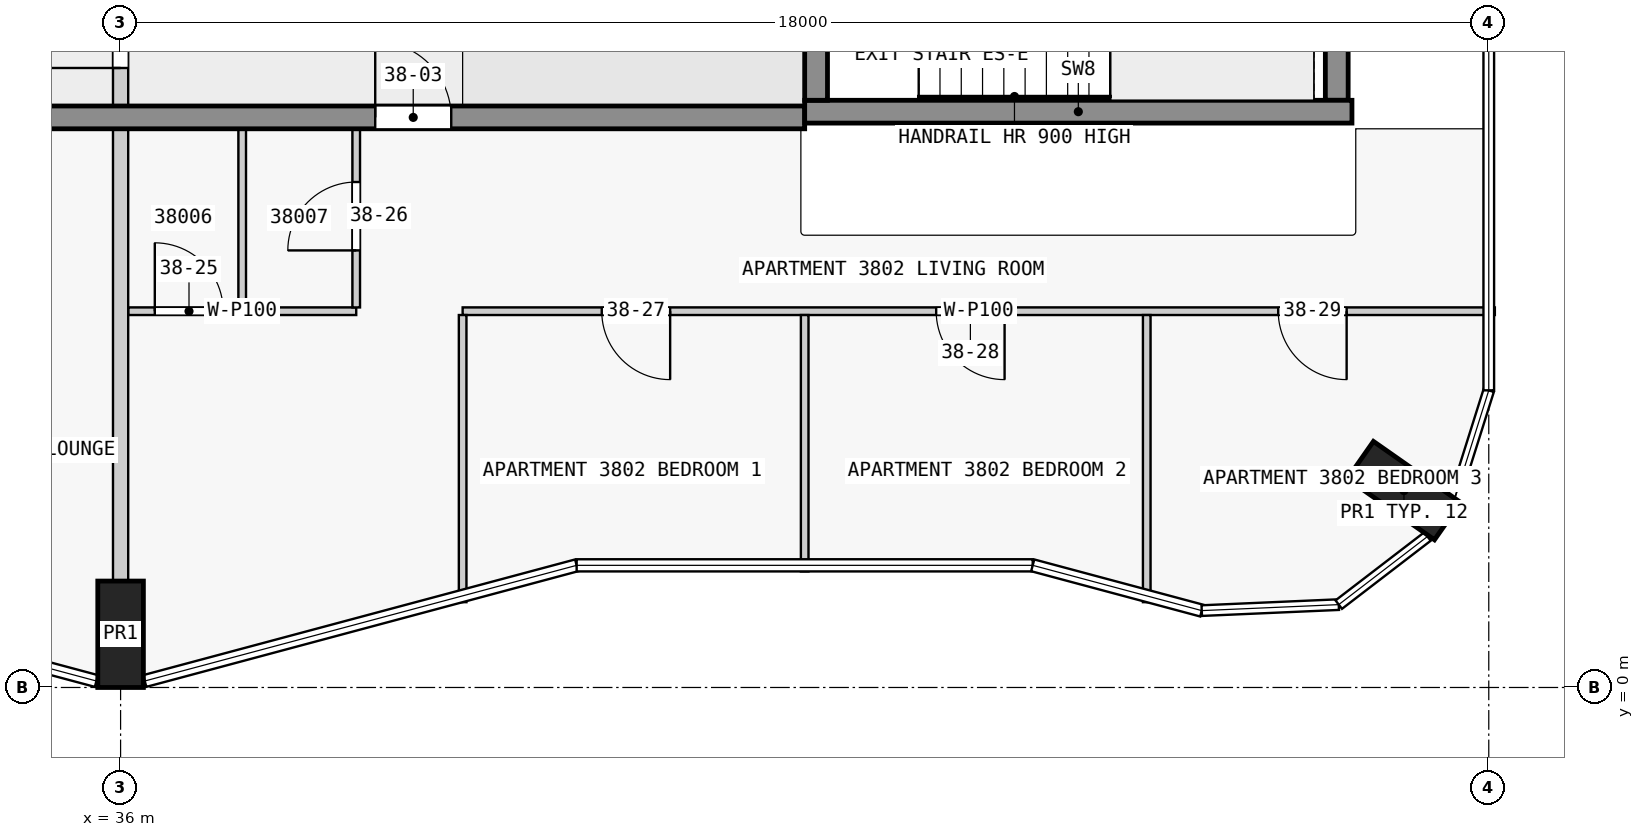
"""IFC4 building model, lengths in metres.
Left out: names, types, materials, properties, quantities, classifications, styles, units other than length and angle.
Written with IfcOpenShell. Run it as: python <this file> out.ifc"""

import sys

from ifc_helpers import new_model, si_unit, direction, frame, frame_2d, origin, origin_2d, place, context, subcontext, project, spatial, rectangle, extrude, element, fill, save


model = new_model("IFC4")
c1 = context("Model", 3, precision=1e-05, world=origin(), true_north=direction((0.0, 1.0)))
c2 = subcontext(c1, "Body", "Model", "MODEL_VIEW")
j1 = project(units=[si_unit("LENGTHUNIT", "METRE"), si_unit("PLANEANGLEUNIT", "RADIAN")], contexts=[c1])
p1 = place(None, origin())
s1 = spatial("IfcSite", under=j1, at=p1, CompositionType="ELEMENT")
p2 = place(p1, origin())
s2 = spatial("IfcBuilding", under=s1, at=p2, CompositionType="ELEMENT")
p3 = place(p2, frame((0.0, 0.0, 149.9)))
s3 = spatial("IfcBuildingStorey", under=s2, at=p3, CompositionType="ELEMENT", Elevation=149.9)
for number, where, z_axis, x_axis in (
    (1, (36.0, 0.7, 0.0), (0.0, 0.0, 1.0), (1.0, 0.0, 0.0)),
    (2, (52.884, 2.59, 0.0), (0.0, 0.0, 1.0), (0.574, 0.819, 0.0)),
):
    element("IfcColumn", number, at=place(p3, frame(where, z_axis=z_axis, x_axis=x_axis)), inside=s3, PredefinedType="COLUMN", context=c2, shape_type="SweptSolid", body=[
        extrude(rectangle(XDim=0.6, YDim=1.4, at=origin_2d()), origin(), (0.0, 0.0, 1.0), 3.5),
    ])
p4 = place(p3, frame((45.15, 7.725, 0.0), z_axis=(0.0, 0.0, 1.0), x_axis=(0.0, 1.0, 0.0)))
e3 = element("IfcWall", 3, at=p4, inside=s3, PredefinedType="SHEAR", context=c2, shape_type="SweptSolid", body=[
    extrude(rectangle(XDim=2.55, YDim=0.3, at=frame_2d((1.275, 0.0))), origin(), (0.0, 0.0, 1.0), 3.5),
])
p5 = place(p4, frame((0.725, 0.0, 0.0)))
e4 = element("IfcOpeningElement", 4, at=p5, cuts=e3, PredefinedType="OPENING", context=c2, shape_type="SweptSolid", body=[
    extrude(rectangle(XDim=1.1, YDim=2.1, at=frame_2d((0.55, 1.05))), frame((0.0, 0.16, 0.0), z_axis=(0.0, -1.0, 0.0), x_axis=(1.0, 0.0, 0.0)), (0.0, 0.0, 1.0), 0.32),
])
p6 = place(p3, frame((52.0, 7.725, 0.0), z_axis=(0.0, 0.0, 1.0), x_axis=(0.0, 1.0, 0.0)))
e5 = element("IfcWall", 5, at=p6, inside=s3, PredefinedType="SHEAR", context=c2, shape_type="SweptSolid", body=[
    extrude(rectangle(XDim=2.55, YDim=0.3, at=frame_2d((1.275, 0.0))), origin(), (0.0, 0.0, 1.0), 3.5),
])
p7 = place(p3, frame((45.0, 7.575, 0.0), z_axis=(0.0, 0.0, 1.0), x_axis=(1.0, 0.0, 0.0)))
e6 = element("IfcWall", 6, at=p7, inside=s3, PredefinedType="SHEAR", context=c2, shape_type="SweptSolid", body=[
    extrude(rectangle(XDim=7.2, YDim=0.3, at=frame_2d((3.6, 0.0))), origin(), (0.0, 0.0, 1.0), 3.5),
])
p8 = place(p3, frame((22.5, 7.5, 0.0), z_axis=(0.0, 0.0, 1.0), x_axis=(1.0, 0.0, 0.0)))
e7 = element("IfcWall", 7, at=p8, inside=s3, PredefinedType="SHEAR", context=c2, shape_type="SweptSolid", body=[
    extrude(rectangle(XDim=22.5, YDim=0.3, at=frame_2d((11.25, 0.0))), origin(), (0.0, 0.0, 1.0), 3.25),
])
p9 = place(p8, frame((4.05, 0.0, 0.0)))
e8 = element("IfcOpeningElement", 8, at=p9, cuts=e7, PredefinedType="OPENING", context=c2, shape_type="SweptSolid", body=[
    extrude(rectangle(XDim=1.0, YDim=2.1, at=frame_2d((0.5, 1.05))), frame((0.0, 0.16, 0.0), z_axis=(0.0, -1.0, 0.0), x_axis=(1.0, 0.0, 0.0)), (0.0, 0.0, 1.0), 0.32),
])
p10 = place(p8, frame((10.35, 0.0, 0.0)))
e9 = element("IfcOpeningElement", 9, at=p10, cuts=e7, PredefinedType="OPENING", context=c2, shape_type="SweptSolid", body=[
    extrude(rectangle(XDim=1.8, YDim=2.1, at=frame_2d((0.9, 1.05))), frame((0.0, 0.16, 0.0), z_axis=(0.0, -1.0, 0.0), x_axis=(1.0, 0.0, 0.0)), (0.0, 0.0, 1.0), 0.32),
])
p11 = place(p8, frame((16.85, 0.0, 0.0)))
e10 = element("IfcOpeningElement", 10, at=p11, cuts=e7, PredefinedType="OPENING", context=c2, shape_type="SweptSolid", body=[
    extrude(rectangle(XDim=1.0, YDim=2.1, at=frame_2d((0.5, 1.05))), frame((0.0, 0.16, 0.0), z_axis=(0.0, -1.0, 0.0), x_axis=(1.0, 0.0, 0.0)), (0.0, 0.0, 1.0), 0.32),
])
p12 = place(p3, frame((54.08, 4.95, 0.0), z_axis=(0.0, 0.0, 1.0), x_axis=(-1.0, 0.0, 0.0)))
e11 = element("IfcWall", 11, at=p12, inside=s3, PredefinedType="PARTITIONING", context=c2, shape_type="SweptSolid", body=[
    extrude(rectangle(XDim=13.58, YDim=0.1, at=frame_2d((6.79, 0.0))), origin(), (0.0, 0.0, 1.0), 3.25),
])
p13 = place(p12, frame((10.85, 0.0, 0.0)))
e12 = element("IfcOpeningElement", 12, at=p13, cuts=e11, PredefinedType="OPENING", context=c2, shape_type="SweptSolid", body=[
    extrude(rectangle(XDim=0.9, YDim=2.1, at=frame_2d((0.45, 1.05))), frame((0.0, 0.06, 0.0), z_axis=(0.0, -1.0, 0.0), x_axis=(1.0, 0.0, 0.0)), (0.0, 0.0, 1.0), 0.12),
])
p14 = place(p12, frame((6.45, 0.0, 0.0)))
e13 = element("IfcOpeningElement", 13, at=p14, cuts=e11, PredefinedType="OPENING", context=c2, shape_type="SweptSolid", body=[
    extrude(rectangle(XDim=0.9, YDim=2.1, at=frame_2d((0.45, 1.05))), frame((0.0, 0.06, 0.0), z_axis=(0.0, -1.0, 0.0), x_axis=(1.0, 0.0, 0.0)), (0.0, 0.0, 1.0), 0.12),
])
p15 = place(p12, frame((1.95, 0.0, 0.0)))
e14 = element("IfcOpeningElement", 14, at=p15, cuts=e11, PredefinedType="OPENING", context=c2, shape_type="SweptSolid", body=[
    extrude(rectangle(XDim=0.9, YDim=2.1, at=frame_2d((0.45, 1.05))), frame((0.0, 0.06, 0.0), z_axis=(0.0, -1.0, 0.0), x_axis=(1.0, 0.0, 0.0)), (0.0, 0.0, 1.0), 0.12),
])
p16 = place(p3, frame((36.1, 4.95, 0.0), z_axis=(0.0, 0.0, 1.0), x_axis=(1.0, 0.0, 0.0)))
e15 = element("IfcWall", 15, at=p16, inside=s3, PredefinedType="PARTITIONING", context=c2, shape_type="SweptSolid", body=[
    extrude(rectangle(XDim=3.0, YDim=0.1, at=frame_2d((1.5, 0.0))), origin(), (0.0, 0.0, 1.0), 3.25),
])
p17 = place(p16, frame((0.35, 0.0, 0.0)))
e16 = element("IfcOpeningElement", 16, at=p17, cuts=e15, PredefinedType="OPENING", context=c2, shape_type="SweptSolid", body=[
    extrude(rectangle(XDim=0.9, YDim=2.1, at=frame_2d((0.45, 1.05))), frame((0.0, 0.06, 0.0), z_axis=(0.0, -1.0, 0.0), x_axis=(1.0, 0.0, 0.0)), (0.0, 0.0, 1.0), 0.12),
])
p18 = place(p3, frame((36.0, 1.4, 0.0), z_axis=(0.0, 0.0, 1.0), x_axis=(0.0, 1.0, 0.0)))
e17 = element("IfcWall", 17, at=p18, inside=s3, PredefinedType="PARTITIONING", context=c2, shape_type="SweptSolid", body=[
    extrude(rectangle(XDim=5.95, YDim=0.2, at=frame_2d((2.975, 0.0))), origin(), (0.0, 0.0, 1.0), 3.25),
])
p19 = place(p3, frame((37.6, 5.0, 0.0), z_axis=(0.0, 0.0, 1.0), x_axis=(0.0, 1.0, 0.0)))
e18 = element("IfcWall", 18, at=p19, inside=s3, PredefinedType="PARTITIONING", context=c2, shape_type="SweptSolid", body=[
    extrude(rectangle(XDim=2.35, YDim=0.1, at=frame_2d((1.175, 0.0))), origin(), (0.0, 0.0, 1.0), 3.25),
])
p20 = place(p3, frame((39.1, 5.0, 0.0), z_axis=(0.0, 0.0, 1.0), x_axis=(0.0, 1.0, 0.0)))
e19 = element("IfcWall", 19, at=p20, inside=s3, PredefinedType="PARTITIONING", context=c2, shape_type="SweptSolid", body=[
    extrude(rectangle(XDim=2.35, YDim=0.1, at=frame_2d((1.175, 0.0))), origin(), (0.0, 0.0, 1.0), 3.25),
])
p21 = place(p20, frame((0.75, 0.0, 0.0)))
e20 = element("IfcOpeningElement", 20, at=p21, cuts=e19, PredefinedType="OPENING", context=c2, shape_type="SweptSolid", body=[
    extrude(rectangle(XDim=0.9, YDim=2.1, at=frame_2d((0.45, 1.05))), frame((0.0, 0.06, 0.0), z_axis=(0.0, -1.0, 0.0), x_axis=(1.0, 0.0, 0.0)), (0.0, 0.0, 1.0), 0.12),
])
p22 = place(p3, frame((40.5, 4.9, 0.0), z_axis=(0.0, 0.0, 1.0), x_axis=(0.0, -1.0, 0.0)))
e21 = element("IfcWall", 21, at=p22, inside=s3, PredefinedType="PARTITIONING", context=c2, shape_type="SweptSolid", body=[
    extrude(rectangle(XDim=3.778, YDim=0.1, at=frame_2d((1.889, 0.0))), origin(), (0.0, 0.0, 1.0), 3.25),
])
p23 = place(p3, frame((45.0, 1.527, 0.0), z_axis=(0.0, 0.0, 1.0), x_axis=(0.0, 1.0, 0.0)))
e22 = element("IfcWall", 22, at=p23, inside=s3, PredefinedType="PARTITIONING", context=c2, shape_type="SweptSolid", body=[
    extrude(rectangle(XDim=3.373, YDim=0.1, at=frame_2d((1.687, 0.0))), origin(), (0.0, 0.0, 1.0), 3.25),
])
p24 = place(p3, frame((49.5, 1.122, 0.0), z_axis=(0.0, 0.0, 1.0), x_axis=(0.0, 1.0, 0.0)))
e23 = element("IfcWall", 23, at=p24, inside=s3, PredefinedType="PARTITIONING", context=c2, shape_type="SweptSolid", body=[
    extrude(rectangle(XDim=3.778, YDim=0.1, at=frame_2d((1.889, 0.0))), origin(), (0.0, 0.0, 1.0), 3.25),
])
p25 = place(p3, frame((36.0, 7.45, 0.0), z_axis=(0.0, 0.0, 1.0), x_axis=(0.0, 1.0, 0.0)))
e24 = element("IfcWall", 24, at=p25, inside=s3, PredefinedType="PARTITIONING", context=c2, shape_type="SweptSolid", body=[
    extrude(rectangle(XDim=3.2, YDim=0.2, at=frame_2d((1.6, 0.0))), origin(), (0.0, 0.0, 1.0), 3.25),
])
p26 = place(p25, frame((0.7, 0.0, 0.0)))
e25 = element("IfcOpeningElement", 25, at=p26, cuts=e24, PredefinedType="OPENING", context=c2, shape_type="SweptSolid", body=[
    extrude(rectangle(XDim=1.8, YDim=2.1, at=frame_2d((0.9, 1.05))), frame((0.0, 0.11, 0.0), z_axis=(0.0, -1.0, 0.0), x_axis=(1.0, 0.0, 0.0)), (0.0, 0.0, 1.0), 0.22),
])
p27 = place(p11, origin())
e26 = element("IfcDoor", 26, at=p27, inside=s3, OperationType="SINGLE_SWING_RIGHT", PredefinedType="DOOR", context=c2, shape_type="SweptSolid", body=[
    extrude(rectangle(XDim=1.0, YDim=2.1, at=frame_2d((0.5, 1.05))), frame((0.0, 0.025, 0.0), z_axis=(0.0, -1.0, 0.0), x_axis=(1.0, 0.0, 0.0)), (0.0, 0.0, 1.0), 0.05),
])
fill(e10, e26)
p28 = place(p26, origin())
e27 = element("IfcDoor", 27, at=p28, inside=s3, OperationType="SINGLE_SWING_LEFT", PredefinedType="DOOR", context=c2, shape_type="SweptSolid", body=[
    extrude(rectangle(XDim=1.8, YDim=2.1, at=frame_2d((0.9, 1.05))), frame((0.0, 0.025, 0.0), z_axis=(0.0, -1.0, 0.0), x_axis=(1.0, 0.0, 0.0)), (0.0, 0.0, 1.0), 0.05),
])
fill(e25, e27)
p29 = place(p17, origin())
e28 = element("IfcDoor", 28, at=p29, inside=s3, OperationType="SINGLE_SWING_LEFT", PredefinedType="DOOR", context=c2, shape_type="SweptSolid", body=[
    extrude(rectangle(XDim=0.9, YDim=2.1, at=frame_2d((0.45, 1.05))), frame((0.0, 0.025, 0.0), z_axis=(0.0, -1.0, 0.0), x_axis=(1.0, 0.0, 0.0)), (0.0, 0.0, 1.0), 0.05),
])
fill(e16, e28)
p30 = place(p21, origin())
e29 = element("IfcDoor", 29, at=p30, inside=s3, OperationType="SINGLE_SWING_RIGHT", PredefinedType="DOOR", context=c2, shape_type="SweptSolid", body=[
    extrude(rectangle(XDim=0.9, YDim=2.1, at=frame_2d((0.45, 1.05))), frame((0.0, 0.025, 0.0), z_axis=(0.0, -1.0, 0.0), x_axis=(1.0, 0.0, 0.0)), (0.0, 0.0, 1.0), 0.05),
])
fill(e20, e29)
p31 = place(p13, origin())
e30 = element("IfcDoor", 30, at=p31, inside=s3, OperationType="SINGLE_SWING_RIGHT", PredefinedType="DOOR", context=c2, shape_type="SweptSolid", body=[
    extrude(rectangle(XDim=0.9, YDim=2.1, at=frame_2d((0.45, 1.05))), frame((0.0, 0.025, 0.0), z_axis=(0.0, -1.0, 0.0), x_axis=(1.0, 0.0, 0.0)), (0.0, 0.0, 1.0), 0.05),
])
fill(e12, e30)
p32 = place(p14, origin())
e31 = element("IfcDoor", 31, at=p32, inside=s3, OperationType="SINGLE_SWING_RIGHT", PredefinedType="DOOR", context=c2, shape_type="SweptSolid", body=[
    extrude(rectangle(XDim=0.9, YDim=2.1, at=frame_2d((0.45, 1.05))), frame((0.0, 0.025, 0.0), z_axis=(0.0, -1.0, 0.0), x_axis=(1.0, 0.0, 0.0)), (0.0, 0.0, 1.0), 0.05),
])
fill(e13, e31)
p33 = place(p15, origin())
e32 = element("IfcDoor", 32, at=p33, inside=s3, OperationType="SINGLE_SWING_LEFT", PredefinedType="DOOR", context=c2, shape_type="SweptSolid", body=[
    extrude(rectangle(XDim=0.9, YDim=2.1, at=frame_2d((0.45, 1.05))), frame((0.0, 0.025, 0.0), z_axis=(0.0, -1.0, 0.0), x_axis=(1.0, 0.0, 0.0)), (0.0, 0.0, 1.0), 0.05),
])
fill(e14, e32)
save(model, sys.argv[1])
